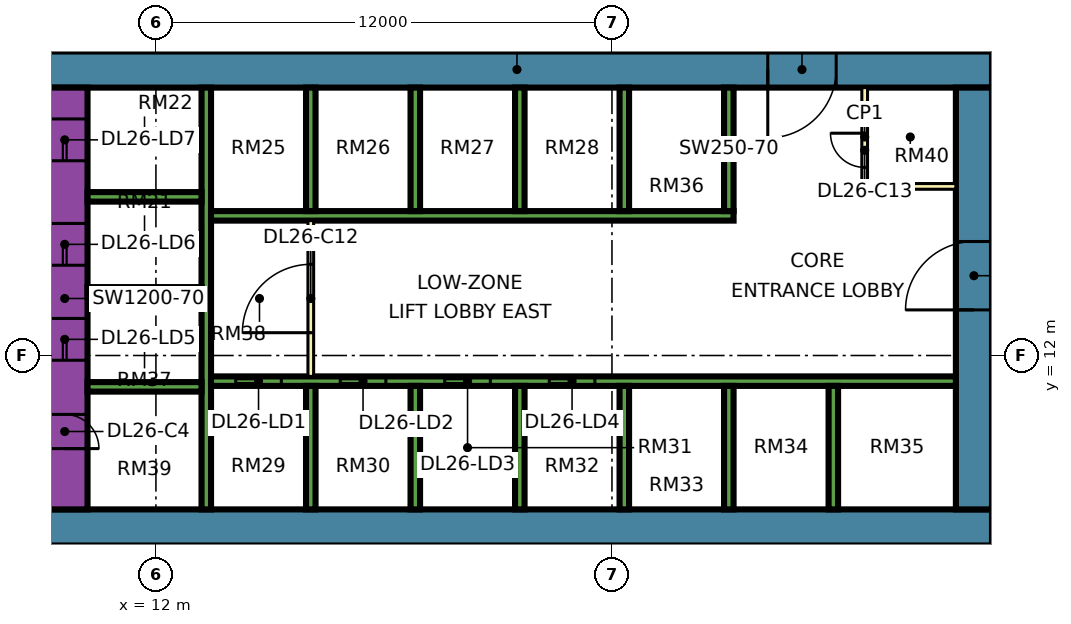
"""IFC4 building model, lengths in metres.
Left out: names, types, materials, properties, quantities, classifications, styles, units other than length and angle.
Written with IfcOpenShell. Run it as: python <this file> out.ifc"""

import sys

from ifc_helpers import new_model, si_unit, direction, frame, frame_2d, origin, place, context, subcontext, project, spatial, rectangle, extrude, element, fill, save


model = new_model("IFC4")
c1 = context("Model", 3, precision=1e-05, world=origin(), true_north=direction((0.0, 1.0)))
c2 = subcontext(c1, "Body", "Model", "MODEL_VIEW")
j1 = project(units=[si_unit("LENGTHUNIT", "METRE"), si_unit("PLANEANGLEUNIT", "RADIAN")], contexts=[c1])
p1 = place(None, origin())
s1 = spatial("IfcSite", under=j1, at=p1, CompositionType="ELEMENT")
p2 = place(p1, origin())
s2 = spatial("IfcBuilding", under=s1, at=p2, CompositionType="ELEMENT")
p3 = place(p2, frame((0.0, 0.0, 114.4)))
s3 = spatial("IfcBuildingStorey", under=s2, at=p3, CompositionType="ELEMENT", Elevation=114.4)
p4 = place(p3, frame((9.0, 7.475, 0.0), z_axis=(0.0, 0.0, 1.0), x_axis=(1.0, 0.0, 0.0)))
e1 = element("IfcWall", 1, at=p4, inside=s3, PredefinedType="SHEAR", context=c2, shape_type="SweptSolid", body=[
    extrude(rectangle(XDim=25.0, YDim=0.95, at=frame_2d((12.5, 0.0))), origin(), (0.0, 0.0, 1.0), 3.75),
])
p5 = place(p3, frame((9.0, 19.525, 0.0), z_axis=(0.0, 0.0, 1.0), x_axis=(1.0, 0.0, 0.0)))
e2 = element("IfcWall", 2, at=p5, inside=s3, PredefinedType="SHEAR", context=c2, shape_type="SweptSolid", body=[
    extrude(rectangle(XDim=25.0, YDim=0.95, at=frame_2d((12.5, 0.0))), origin(), (0.0, 0.0, 1.0), 3.75),
])
p6 = place(p5, frame((19.1, 0.0, 0.0)))
e3 = element("IfcOpeningElement", 3, at=p6, cuts=e2, PredefinedType="OPENING", context=c2, shape_type="SweptSolid", body=[
    extrude(rectangle(XDim=1.8, YDim=2.4, at=frame_2d((0.9, 1.2))), frame((0.0, 0.485, 0.0), z_axis=(0.0, -1.0, 0.0), x_axis=(1.0, 0.0, 0.0)), (0.0, 0.0, 1.0), 0.97),
])
p7 = place(p3, frame((9.6, 7.95, 0.0), z_axis=(0.0, 0.0, 1.0), x_axis=(0.0, 1.0, 0.0)))
e4 = element("IfcWall", 4, at=p7, inside=s3, PredefinedType="SHEAR", context=c2, shape_type="SweptSolid", body=[
    extrude(rectangle(XDim=11.1, YDim=1.2, at=frame_2d((5.55, 0.0))), origin(), (0.0, 0.0, 1.0), 3.75),
])
p8 = place(p7, frame((3.925, 0.0, 0.0)))
e5 = element("IfcOpeningElement", 5, at=p8, cuts=e4, PredefinedType="OPENING", context=c2, shape_type="SweptSolid", body=[
    extrude(rectangle(XDim=1.1, YDim=2.2, at=frame_2d((0.55, 1.1))), frame((0.0, 0.61, 0.0), z_axis=(0.0, -1.0, 0.0), x_axis=(1.0, 0.0, 0.0)), (0.0, 0.0, 1.0), 1.22),
])
p9 = place(p7, frame((6.425, 0.0, 0.0)))
e6 = element("IfcOpeningElement", 6, at=p9, cuts=e4, PredefinedType="OPENING", context=c2, shape_type="SweptSolid", body=[
    extrude(rectangle(XDim=1.1, YDim=2.2, at=frame_2d((0.55, 1.1))), frame((0.0, 0.61, 0.0), z_axis=(0.0, -1.0, 0.0), x_axis=(1.0, 0.0, 0.0)), (0.0, 0.0, 1.0), 1.22),
])
p10 = place(p7, frame((9.175, 0.0, 0.0)))
e7 = element("IfcOpeningElement", 7, at=p10, cuts=e4, PredefinedType="OPENING", context=c2, shape_type="SweptSolid", body=[
    extrude(rectangle(XDim=1.1, YDim=2.2, at=frame_2d((0.55, 1.1))), frame((0.0, 0.61, 0.0), z_axis=(0.0, -1.0, 0.0), x_axis=(1.0, 0.0, 0.0)), (0.0, 0.0, 1.0), 1.22),
])
p11 = place(p7, frame((1.6, 0.0, 0.0)))
e8 = element("IfcOpeningElement", 8, at=p11, cuts=e4, PredefinedType="OPENING", context=c2, shape_type="SweptSolid", body=[
    extrude(rectangle(XDim=0.9, YDim=2.1, at=frame_2d((0.45, 1.05))), frame((0.0, 0.61, 0.0), z_axis=(0.0, -1.0, 0.0), x_axis=(1.0, 0.0, 0.0)), (0.0, 0.0, 1.0), 1.22),
])
p12 = place(p3, frame((33.525, 7.95, 0.0), z_axis=(0.0, 0.0, 1.0), x_axis=(0.0, 1.0, 0.0)))
e9 = element("IfcWall", 9, at=p12, inside=s3, PredefinedType="SHEAR", context=c2, shape_type="SweptSolid", body=[
    extrude(rectangle(XDim=11.1, YDim=0.95, at=frame_2d((5.55, 0.0))), origin(), (0.0, 0.0, 1.0), 3.75),
])
p13 = place(p12, frame((5.25, 0.0, 0.0)))
e10 = element("IfcOpeningElement", 10, at=p13, cuts=e9, PredefinedType="OPENING", context=c2, shape_type="SweptSolid", body=[
    extrude(rectangle(XDim=1.8, YDim=2.4, at=frame_2d((0.9, 1.2))), frame((0.0, 0.485, 0.0), z_axis=(0.0, -1.0, 0.0), x_axis=(1.0, 0.0, 0.0)), (0.0, 0.0, 1.0), 0.97),
])
p14 = place(p3, frame((13.325, 7.95, 0.0), z_axis=(0.0, 0.0, 1.0), x_axis=(0.0, 1.0, 0.0)))
e11 = element("IfcWall", 11, at=p14, inside=s3, PredefinedType="SHEAR", context=c2, shape_type="SweptSolid", body=[
    extrude(rectangle(XDim=11.1, YDim=0.25, at=frame_2d((5.55, 0.0))), origin(), (0.0, 0.0, 1.0), 3.75),
])
p15 = place(p3, frame((13.45, 11.325, 0.0), z_axis=(0.0, 0.0, 1.0), x_axis=(1.0, 0.0, 0.0)))
e12 = element("IfcWall", 12, at=p15, inside=s3, PredefinedType="SHEAR", context=c2, shape_type="SweptSolid", body=[
    extrude(rectangle(XDim=19.6, YDim=0.25, at=frame_2d((9.8, 0.0))), origin(), (0.0, 0.0, 1.0), 3.75),
])
p16 = place(p15, frame((0.65, 0.0, 0.0)))
e13 = element("IfcOpeningElement", 13, at=p16, cuts=e12, PredefinedType="OPENING", context=c2, shape_type="SweptSolid", body=[
    extrude(rectangle(XDim=1.2, YDim=2.2, at=frame_2d((0.6, 1.1))), frame((0.0, 0.135, 0.0), z_axis=(0.0, -1.0, 0.0), x_axis=(1.0, 0.0, 0.0)), (0.0, 0.0, 1.0), 0.27),
])
p17 = place(p15, frame((3.4, 0.0, 0.0)))
e14 = element("IfcOpeningElement", 14, at=p17, cuts=e12, PredefinedType="OPENING", context=c2, shape_type="SweptSolid", body=[
    extrude(rectangle(XDim=1.2, YDim=2.2, at=frame_2d((0.6, 1.1))), frame((0.0, 0.135, 0.0), z_axis=(0.0, -1.0, 0.0), x_axis=(1.0, 0.0, 0.0)), (0.0, 0.0, 1.0), 0.27),
])
p18 = place(p15, frame((6.15, 0.0, 0.0)))
e15 = element("IfcOpeningElement", 15, at=p18, cuts=e12, PredefinedType="OPENING", context=c2, shape_type="SweptSolid", body=[
    extrude(rectangle(XDim=1.2, YDim=2.2, at=frame_2d((0.6, 1.1))), frame((0.0, 0.135, 0.0), z_axis=(0.0, -1.0, 0.0), x_axis=(1.0, 0.0, 0.0)), (0.0, 0.0, 1.0), 0.27),
])
p19 = place(p15, frame((8.9, 0.0, 0.0)))
e16 = element("IfcOpeningElement", 16, at=p19, cuts=e12, PredefinedType="OPENING", context=c2, shape_type="SweptSolid", body=[
    extrude(rectangle(XDim=1.2, YDim=2.2, at=frame_2d((0.6, 1.1))), frame((0.0, 0.135, 0.0), z_axis=(0.0, -1.0, 0.0), x_axis=(1.0, 0.0, 0.0)), (0.0, 0.0, 1.0), 0.27),
])
p20 = place(p3, frame((13.45, 15.675, 0.0), z_axis=(0.0, 0.0, 1.0), x_axis=(1.0, 0.0, 0.0)))
e17 = element("IfcWall", 17, at=p20, inside=s3, PredefinedType="SHEAR", context=c2, shape_type="SweptSolid", body=[
    extrude(rectangle(XDim=13.75, YDim=0.25, at=frame_2d((6.875, 0.0))), origin(), (0.0, 0.0, 1.0), 3.75),
])
for number, where, z_axis, x_axis in (
    (18, (10.2, 11.175, 0.0), (0.0, 0.0, 1.0), (1.0, 0.0, 0.0)),
    (19, (10.2, 13.675, 0.0), (0.0, 0.0, 1.0), (1.0, 0.0, 0.0)),
    (20, (10.2, 16.175, 0.0), (0.0, 0.0, 1.0), (1.0, 0.0, 0.0)),
):
    element("IfcWall", number, at=place(p3, frame(where, z_axis=z_axis, x_axis=x_axis)), inside=s3, PredefinedType="SHEAR", context=c2, shape_type="SweptSolid", body=[
        extrude(rectangle(XDim=3.0, YDim=0.25, at=frame_2d((1.5, 0.0))), origin(), (0.0, 0.0, 1.0), 3.75),
    ])
for number, where, z_axis, x_axis in (
    (21, (16.075, 7.95, 0.0), (0.0, 0.0, 1.0), (0.0, 1.0, 0.0)),
    (22, (18.825, 7.95, 0.0), (0.0, 0.0, 1.0), (0.0, 1.0, 0.0)),
    (23, (21.575, 7.95, 0.0), (0.0, 0.0, 1.0), (0.0, 1.0, 0.0)),
    (24, (24.325, 7.95, 0.0), (0.0, 0.0, 1.0), (0.0, 1.0, 0.0)),
    (25, (27.075, 7.95, 0.0), (0.0, 0.0, 1.0), (0.0, 1.0, 0.0)),
    (26, (29.825, 7.95, 0.0), (0.0, 0.0, 1.0), (0.0, 1.0, 0.0)),
    (27, (16.075, 15.8, 0.0), (0.0, 0.0, 1.0), (0.0, 1.0, 0.0)),
    (28, (18.825, 15.8, 0.0), (0.0, 0.0, 1.0), (0.0, 1.0, 0.0)),
    (29, (21.575, 15.8, 0.0), (0.0, 0.0, 1.0), (0.0, 1.0, 0.0)),
    (30, (24.325, 15.8, 0.0), (0.0, 0.0, 1.0), (0.0, 1.0, 0.0)),
    (31, (27.075, 15.8, 0.0), (0.0, 0.0, 1.0), (0.0, 1.0, 0.0)),
):
    element("IfcWall", number, at=place(p3, frame(where, z_axis=z_axis, x_axis=x_axis)), inside=s3, PredefinedType="SHEAR", context=c2, shape_type="SweptSolid", body=[
        extrude(rectangle(XDim=3.25, YDim=0.25, at=frame_2d((1.625, 0.0))), origin(), (0.0, 0.0, 1.0), 3.75),
    ])
p21 = place(p3, frame((-1.447, 12.553, 0.0), z_axis=(0.0, 0.0, 1.0), x_axis=(0.707106781187, -0.707106781187, 0.0)))
e32 = element("IfcWall", 32, at=p21, inside=s3, PredefinedType="SOLIDWALL", context=c2, shape_type="SweptSolid", body=[
    extrude(rectangle(XDim=19.799, YDim=0.15, at=frame_2d((9.899, 0.0))), origin(), (0.0, 0.0, 1.0), 3.35),
])
p22 = place(p21, frame((2.212, 0.0, 0.45)))
e33 = element("IfcOpeningElement", 33, at=p22, cuts=e32, PredefinedType="OPENING", context=c2, shape_type="SweptSolid", body=[
    extrude(rectangle(XDim=3.0, YDim=2.4, at=frame_2d((1.5, 1.2))), frame((0.0, 0.085, 0.0), z_axis=(0.0, -1.0, 0.0), x_axis=(1.0, 0.0, 0.0)), (0.0, 0.0, 1.0), 0.17),
])
p23 = place(p21, frame((10.216, 0.0, 0.45)))
e34 = element("IfcOpeningElement", 34, at=p23, cuts=e32, PredefinedType="OPENING", context=c2, shape_type="SweptSolid", body=[
    extrude(rectangle(XDim=3.0, YDim=2.4, at=frame_2d((1.5, 1.2))), frame((0.0, 0.085, 0.0), z_axis=(0.0, -1.0, 0.0), x_axis=(1.0, 0.0, 0.0)), (0.0, 0.0, 1.0), 0.17),
])
p24 = place(p3, frame((16.075, 11.45, 0.0), z_axis=(0.0, 0.0, 1.0), x_axis=(0.0, 1.0, 0.0)))
e35 = element("IfcWall", 35, at=p24, inside=s3, PredefinedType="PARTITIONING", context=c2, shape_type="SweptSolid", body=[
    extrude(rectangle(XDim=4.1, YDim=0.15, at=frame_2d((2.05, 0.0))), origin(), (0.0, 0.0, 1.0), 3.35),
])
p25 = place(p24, frame((1.15, 0.0, 0.0)))
e36 = element("IfcOpeningElement", 36, at=p25, cuts=e35, PredefinedType="OPENING", context=c2, shape_type="SweptSolid", body=[
    extrude(rectangle(XDim=1.8, YDim=2.4, at=frame_2d((0.9, 1.2))), frame((0.0, 0.085, 0.0), z_axis=(0.0, -1.0, 0.0), x_axis=(1.0, 0.0, 0.0)), (0.0, 0.0, 1.0), 0.17),
])
p26 = place(p3, frame((30.65, 16.45, 0.0), z_axis=(0.0, 0.0, 1.0), x_axis=(0.0, 1.0, 0.0)))
e37 = element("IfcWall", 37, at=p26, inside=s3, PredefinedType="PARTITIONING", context=c2, shape_type="SweptSolid", body=[
    extrude(rectangle(XDim=2.6, YDim=0.15, at=frame_2d((1.3, 0.0))), origin(), (0.0, 0.0, 1.0), 3.35),
])
p27 = place(p26, frame((0.5, 0.0, 0.0)))
e38 = element("IfcOpeningElement", 38, at=p27, cuts=e37, PredefinedType="OPENING", context=c2, shape_type="SweptSolid", body=[
    extrude(rectangle(XDim=0.9, YDim=2.1, at=frame_2d((0.45, 1.05))), frame((0.0, 0.085, 0.0), z_axis=(0.0, -1.0, 0.0), x_axis=(1.0, 0.0, 0.0)), (0.0, 0.0, 1.0), 0.17),
])
p28 = place(p3, frame((30.65, 16.45, 0.0), z_axis=(0.0, 0.0, 1.0), x_axis=(1.0, 0.0, 0.0)))
e39 = element("IfcWall", 39, at=p28, inside=s3, PredefinedType="PARTITIONING", context=c2, shape_type="SweptSolid", body=[
    extrude(rectangle(XDim=2.4, YDim=0.15, at=frame_2d((1.2, 0.0))), origin(), (0.0, 0.0, 1.0), 3.35),
])
p29 = place(p16, origin())
e40 = element("IfcDoor", 40, at=p29, inside=s3, OperationType="DOUBLE_DOOR_SLIDING", PredefinedType="DOOR", context=c2, shape_type="SweptSolid", body=[
    extrude(rectangle(XDim=1.2, YDim=2.2, at=frame_2d((0.6, 1.1))), frame((0.0, 0.025, 0.0), z_axis=(0.0, -1.0, 0.0), x_axis=(1.0, 0.0, 0.0)), (0.0, 0.0, 1.0), 0.05),
])
fill(e13, e40)
p30 = place(p17, origin())
e41 = element("IfcDoor", 41, at=p30, inside=s3, OperationType="DOUBLE_DOOR_SLIDING", PredefinedType="DOOR", context=c2, shape_type="SweptSolid", body=[
    extrude(rectangle(XDim=1.2, YDim=2.2, at=frame_2d((0.6, 1.1))), frame((0.0, 0.025, 0.0), z_axis=(0.0, -1.0, 0.0), x_axis=(1.0, 0.0, 0.0)), (0.0, 0.0, 1.0), 0.05),
])
fill(e14, e41)
p31 = place(p18, origin())
e42 = element("IfcDoor", 42, at=p31, inside=s3, OperationType="DOUBLE_DOOR_SLIDING", PredefinedType="DOOR", context=c2, shape_type="SweptSolid", body=[
    extrude(rectangle(XDim=1.2, YDim=2.2, at=frame_2d((0.6, 1.1))), frame((0.0, 0.025, 0.0), z_axis=(0.0, -1.0, 0.0), x_axis=(1.0, 0.0, 0.0)), (0.0, 0.0, 1.0), 0.05),
])
fill(e15, e42)
p32 = place(p19, origin())
e43 = element("IfcDoor", 43, at=p32, inside=s3, OperationType="DOUBLE_DOOR_SLIDING", PredefinedType="DOOR", context=c2, shape_type="SweptSolid", body=[
    extrude(rectangle(XDim=1.2, YDim=2.2, at=frame_2d((0.6, 1.1))), frame((0.0, 0.025, 0.0), z_axis=(0.0, -1.0, 0.0), x_axis=(1.0, 0.0, 0.0)), (0.0, 0.0, 1.0), 0.05),
])
fill(e16, e43)
p33 = place(p8, origin())
e44 = element("IfcDoor", 44, at=p33, inside=s3, OperationType="DOUBLE_DOOR_SLIDING", PredefinedType="DOOR", context=c2, shape_type="SweptSolid", body=[
    extrude(rectangle(XDim=1.1, YDim=2.2, at=frame_2d((0.55, 1.1))), frame((0.0, 0.025, 0.0), z_axis=(0.0, -1.0, 0.0), x_axis=(1.0, 0.0, 0.0)), (0.0, 0.0, 1.0), 0.05),
])
fill(e5, e44)
p34 = place(p9, origin())
e45 = element("IfcDoor", 45, at=p34, inside=s3, OperationType="DOUBLE_DOOR_SLIDING", PredefinedType="DOOR", context=c2, shape_type="SweptSolid", body=[
    extrude(rectangle(XDim=1.1, YDim=2.2, at=frame_2d((0.55, 1.1))), frame((0.0, 0.025, 0.0), z_axis=(0.0, -1.0, 0.0), x_axis=(1.0, 0.0, 0.0)), (0.0, 0.0, 1.0), 0.05),
])
fill(e6, e45)
p35 = place(p10, origin())
e46 = element("IfcDoor", 46, at=p35, inside=s3, OperationType="DOUBLE_DOOR_SLIDING", PredefinedType="DOOR", context=c2, shape_type="SweptSolid", body=[
    extrude(rectangle(XDim=1.1, YDim=2.2, at=frame_2d((0.55, 1.1))), frame((0.0, 0.025, 0.0), z_axis=(0.0, -1.0, 0.0), x_axis=(1.0, 0.0, 0.0)), (0.0, 0.0, 1.0), 0.05),
])
fill(e7, e46)
p36 = place(p13, origin())
e47 = element("IfcDoor", 47, at=p36, inside=s3, OperationType="DOUBLE_DOOR_SINGLE_SWING", PredefinedType="DOOR", context=c2, shape_type="SweptSolid", body=[
    extrude(rectangle(XDim=1.8, YDim=2.4, at=frame_2d((0.9, 1.2))), frame((0.0, 0.025, 0.0), z_axis=(0.0, -1.0, 0.0), x_axis=(1.0, 0.0, 0.0)), (0.0, 0.0, 1.0), 0.05),
])
fill(e10, e47)
p37 = place(p6, frame((1.8, 0.0, 0.0), z_axis=(0.0, 0.0, 1.0), x_axis=(-1.0, 0.0, 0.0)))
e48 = element("IfcDoor", 48, at=p37, inside=s3, OperationType="DOUBLE_DOOR_SINGLE_SWING", PredefinedType="DOOR", context=c2, shape_type="SweptSolid", body=[
    extrude(rectangle(XDim=1.8, YDim=2.4, at=frame_2d((0.9, 1.2))), frame((0.0, 0.025, 0.0), z_axis=(0.0, -1.0, 0.0), x_axis=(1.0, 0.0, 0.0)), (0.0, 0.0, 1.0), 0.05),
])
fill(e3, e48)
p38 = place(p11, frame((0.9, 0.0, 0.0), z_axis=(0.0, 0.0, 1.0), x_axis=(-1.0, 0.0, 0.0)))
e49 = element("IfcDoor", 49, at=p38, inside=s3, OperationType="SINGLE_SWING_LEFT", PredefinedType="DOOR", context=c2, shape_type="SweptSolid", body=[
    extrude(rectangle(XDim=0.9, YDim=2.1, at=frame_2d((0.45, 1.05))), frame((0.0, 0.025, 0.0), z_axis=(0.0, -1.0, 0.0), x_axis=(1.0, 0.0, 0.0)), (0.0, 0.0, 1.0), 0.05),
])
fill(e8, e49)
p39 = place(p25, origin())
e50 = element("IfcDoor", 50, at=p39, inside=s3, OperationType="DOUBLE_DOOR_SINGLE_SWING", PredefinedType="DOOR", context=c2, shape_type="SweptSolid", body=[
    extrude(rectangle(XDim=1.8, YDim=2.4, at=frame_2d((0.9, 1.2))), frame((0.0, 0.025, 0.0), z_axis=(0.0, -1.0, 0.0), x_axis=(1.0, 0.0, 0.0)), (0.0, 0.0, 1.0), 0.05),
])
fill(e36, e50)
p40 = place(p27, frame((0.9, 0.0, 0.0), z_axis=(0.0, 0.0, 1.0), x_axis=(-1.0, 0.0, 0.0)))
e51 = element("IfcDoor", 51, at=p40, inside=s3, OperationType="SINGLE_SWING_RIGHT", PredefinedType="DOOR", context=c2, shape_type="SweptSolid", body=[
    extrude(rectangle(XDim=0.9, YDim=2.1, at=frame_2d((0.45, 1.05))), frame((0.0, 0.025, 0.0), z_axis=(0.0, -1.0, 0.0), x_axis=(1.0, 0.0, 0.0)), (0.0, 0.0, 1.0), 0.05),
])
fill(e38, e51)
save(model, sys.argv[1])
